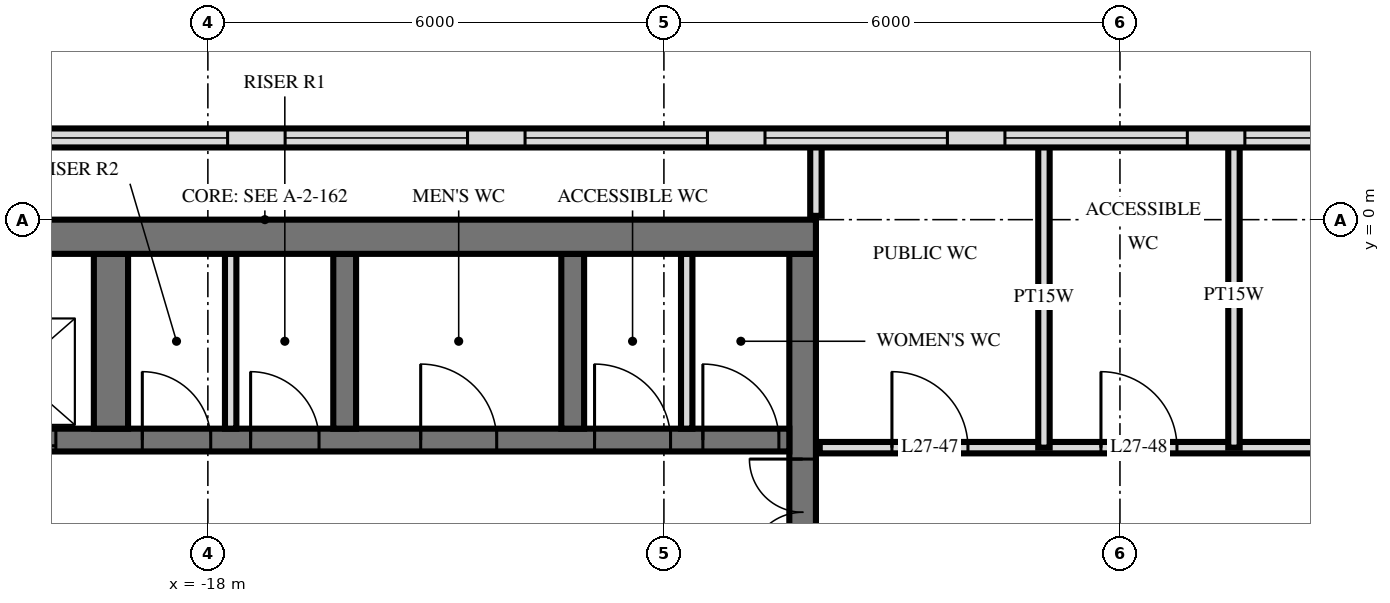
"""IFC4 building model, lengths in metres.
Left out: names, types, materials, properties, quantities, classifications, styles, units other than length and angle.
Written with IfcOpenShell. Run it as: python <this file> out.ifc"""

import sys

from ifc_helpers import new_model, si_unit, direction, frame, frame_2d, origin, place, context, subcontext, project, spatial, rectangle, extrude, element, fill, save


model = new_model("IFC4")
c1 = context("Model", 3, precision=1e-05, world=origin(), true_north=direction((0.0, 1.0)))
c2 = subcontext(c1, "Body", "Model", "MODEL_VIEW")
j1 = project(units=[si_unit("LENGTHUNIT", "METRE"), si_unit("PLANEANGLEUNIT", "RADIAN")], contexts=[c1])
p1 = place(None, origin())
s1 = spatial("IfcSite", under=j1, at=p1, CompositionType="ELEMENT")
p2 = place(p1, origin())
s2 = spatial("IfcBuilding", under=s1, at=p2, CompositionType="ELEMENT")
p3 = place(p2, frame((0.0, 0.0, 106.8)))
s3 = spatial("IfcBuildingStorey", under=s2, at=p3, CompositionType="ELEMENT", Elevation=106.8)
p4 = place(p3, frame((-24.5, -0.225, 0.0), z_axis=(0.0, 0.0, 1.0), x_axis=(1.0, 0.0, 0.0)))
e1 = element("IfcWall", 1, at=p4, inside=s3, PredefinedType="SHEAR", context=c2, shape_type="SweptSolid", body=[
    extrude(rectangle(XDim=14.5, YDim=0.45, at=frame_2d((7.25, 0.0))), origin(), (0.0, 0.0, 1.0), 6.0),
])
p5 = place(p3, frame((-10.175, -14.55, 0.0), z_axis=(0.0, 0.0, 1.0), x_axis=(0.0, 1.0, 0.0)))
e2 = element("IfcWall", 2, at=p5, inside=s3, PredefinedType="SHEAR", context=c2, shape_type="SweptSolid", body=[
    extrude(rectangle(XDim=14.1, YDim=0.35, at=frame_2d((7.05, 0.0))), origin(), (0.0, 0.0, 1.0), 6.0),
])
p6 = place(p5, frame((8.4, 0.0, 0.0)))
e3 = element("IfcOpeningElement", 3, at=p6, cuts=e2, PredefinedType="OPENING", context=c2, shape_type="SweptSolid", body=[
    extrude(rectangle(XDim=1.4, YDim=2.4, at=frame_2d((0.7, 1.2))), frame((0.0, 0.185, 0.0), z_axis=(0.0, -1.0, 0.0), x_axis=(1.0, 0.0, 0.0)), (0.0, 0.0, 1.0), 0.37),
])
p7 = place(p5, frame((10.0, 0.0, 0.0)))
e4 = element("IfcOpeningElement", 4, at=p7, cuts=e2, PredefinedType="OPENING", context=c2, shape_type="SweptSolid", body=[
    extrude(rectangle(XDim=1.4, YDim=2.4, at=frame_2d((0.7, 1.2))), frame((0.0, 0.185, 0.0), z_axis=(0.0, -1.0, 0.0), x_axis=(1.0, 0.0, 0.0)), (0.0, 0.0, 1.0), 0.37),
])
p8 = place(p5, frame((4.0, 0.0, 0.0)))
e5 = element("IfcOpeningElement", 5, at=p8, cuts=e2, PredefinedType="OPENING", context=c2, shape_type="SweptSolid", body=[
    extrude(rectangle(XDim=1.2, YDim=2.1, at=frame_2d((0.6, 1.05))), frame((0.0, 0.185, 0.0), z_axis=(0.0, -1.0, 0.0), x_axis=(1.0, 0.0, 0.0)), (0.0, 0.0, 1.0), 0.37),
])
p9 = place(p3, frame((-24.05, -2.9, 0.0), z_axis=(0.0, 0.0, 1.0), x_axis=(1.0, 0.0, 0.0)))
e6 = element("IfcWall", 6, at=p9, inside=s3, PredefinedType="SHEAR", context=c2, shape_type="SweptSolid", body=[
    extrude(rectangle(XDim=13.7, YDim=0.3, at=frame_2d((6.85, 0.0))), origin(), (0.0, 0.0, 1.0), 6.0),
])
p10 = place(p9, frame((2.95, 0.0, 0.0)))
e7 = element("IfcOpeningElement", 7, at=p10, cuts=e6, PredefinedType="OPENING", context=c2, shape_type="SweptSolid", body=[
    extrude(rectangle(XDim=1.1, YDim=2.1, at=frame_2d((0.55, 1.05))), frame((0.0, 0.16, 0.0), z_axis=(0.0, -1.0, 0.0), x_axis=(1.0, 0.0, 0.0)), (0.0, 0.0, 1.0), 0.32),
])
p11 = place(p9, frame((0.55, 0.0, 0.0)))
e8 = element("IfcOpeningElement", 8, at=p11, cuts=e6, PredefinedType="OPENING", context=c2, shape_type="SweptSolid", body=[
    extrude(rectangle(XDim=1.1, YDim=2.1, at=frame_2d((0.55, 1.05))), frame((0.0, 0.16, 0.0), z_axis=(0.0, -1.0, 0.0), x_axis=(1.0, 0.0, 0.0)), (0.0, 0.0, 1.0), 0.32),
])
p12 = place(p9, frame((6.613, 0.0, 0.0)))
e9 = element("IfcOpeningElement", 9, at=p12, cuts=e6, PredefinedType="OPENING", context=c2, shape_type="SweptSolid", body=[
    extrude(rectangle(XDim=0.9, YDim=2.1, at=frame_2d((0.45, 1.05))), frame((0.0, 0.16, 0.0), z_axis=(0.0, -1.0, 0.0), x_axis=(1.0, 0.0, 0.0)), (0.0, 0.0, 1.0), 0.32),
])
p13 = place(p9, frame((5.188, 0.0, 0.0)))
e10 = element("IfcOpeningElement", 10, at=p13, cuts=e6, PredefinedType="OPENING", context=c2, shape_type="SweptSolid", body=[
    extrude(rectangle(XDim=0.9, YDim=2.1, at=frame_2d((0.45, 1.05))), frame((0.0, 0.16, 0.0), z_axis=(0.0, -1.0, 0.0), x_axis=(1.0, 0.0, 0.0)), (0.0, 0.0, 1.0), 0.32),
])
p14 = place(p9, frame((12.562, 0.0, 0.0)))
e11 = element("IfcOpeningElement", 11, at=p14, cuts=e6, PredefinedType="OPENING", context=c2, shape_type="SweptSolid", body=[
    extrude(rectangle(XDim=1.0, YDim=2.1, at=frame_2d((0.5, 1.05))), frame((0.0, 0.16, 0.0), z_axis=(0.0, -1.0, 0.0), x_axis=(1.0, 0.0, 0.0)), (0.0, 0.0, 1.0), 0.32),
])
p15 = place(p9, frame((11.137, 0.0, 0.0)))
e12 = element("IfcOpeningElement", 12, at=p15, cuts=e6, PredefinedType="OPENING", context=c2, shape_type="SweptSolid", body=[
    extrude(rectangle(XDim=1.0, YDim=2.1, at=frame_2d((0.5, 1.05))), frame((0.0, 0.16, 0.0), z_axis=(0.0, -1.0, 0.0), x_axis=(1.0, 0.0, 0.0)), (0.0, 0.0, 1.0), 0.32),
])
p16 = place(p9, frame((8.85, 0.0, 0.0)))
e13 = element("IfcOpeningElement", 13, at=p16, cuts=e6, PredefinedType="OPENING", context=c2, shape_type="SweptSolid", body=[
    extrude(rectangle(XDim=1.0, YDim=2.1, at=frame_2d((0.5, 1.05))), frame((0.0, 0.16, 0.0), z_axis=(0.0, -1.0, 0.0), x_axis=(1.0, 0.0, 0.0)), (0.0, 0.0, 1.0), 0.32),
])
for number, where, z_axis, x_axis in (
    (14, (-13.2, -2.75, 0.0), (0.0, 0.0, 1.0), (0.0, 1.0, 0.0)),
    (15, (-16.2, -2.75, 0.0), (0.0, 0.0, 1.0), (0.0, 1.0, 0.0)),
):
    element("IfcWall", number, at=place(p3, frame(where, z_axis=z_axis, x_axis=x_axis)), inside=s3, PredefinedType="SHEAR", context=c2, shape_type="SweptSolid", body=[
        extrude(rectangle(XDim=2.3, YDim=0.3, at=frame_2d((1.15, 0.0))), origin(), (0.0, 0.0, 1.0), 6.0),
    ])
p17 = place(p3, frame((-19.275, -2.75, 0.0), z_axis=(0.0, 0.0, 1.0), x_axis=(0.0, 1.0, 0.0)))
e16 = element("IfcWall", 16, at=p17, inside=s3, PredefinedType="SHEAR", context=c2, shape_type="SweptSolid", body=[
    extrude(rectangle(XDim=2.3, YDim=0.45, at=frame_2d((1.15, 0.0))), origin(), (0.0, 0.0, 1.0), 6.0),
])
p18 = place(p3, frame((23.675, 1.075, 0.0), z_axis=(0.0, 0.0, 1.0), x_axis=(-1.0, 0.0, 0.0)))
e17 = element("IfcWall", 17, at=p18, inside=s3, PredefinedType="SOLIDWALL", context=c2, shape_type="SweptSolid", body=[
    extrude(rectangle(XDim=47.351, YDim=0.25, at=frame_2d((23.675, 0.0))), origin(), (0.0, 0.0, 1.0), 5.72),
])
p19 = place(p18, frame((0.378, 0.0, 0.858)))
e18 = element("IfcOpeningElement", 18, at=p19, cuts=e17, PredefinedType="OPENING", context=c2, shape_type="SweptSolid", body=[
    extrude(rectangle(XDim=2.4, YDim=3.6, at=frame_2d((1.2, 1.8))), frame((0.0, 0.135, 0.0), z_axis=(0.0, -1.0, 0.0), x_axis=(1.0, 0.0, 0.0)), (0.0, 0.0, 1.0), 0.27),
])
p20 = place(p18, frame((3.535, 0.0, 0.858)))
e19 = element("IfcOpeningElement", 19, at=p20, cuts=e17, PredefinedType="OPENING", context=c2, shape_type="SweptSolid", body=[
    extrude(rectangle(XDim=2.4, YDim=3.6, at=frame_2d((1.2, 1.8))), frame((0.0, 0.135, 0.0), z_axis=(0.0, -1.0, 0.0), x_axis=(1.0, 0.0, 0.0)), (0.0, 0.0, 1.0), 0.27),
])
p21 = place(p18, frame((6.692, 0.0, 0.858)))
e20 = element("IfcOpeningElement", 20, at=p21, cuts=e17, PredefinedType="OPENING", context=c2, shape_type="SweptSolid", body=[
    extrude(rectangle(XDim=2.4, YDim=3.6, at=frame_2d((1.2, 1.8))), frame((0.0, 0.135, 0.0), z_axis=(0.0, -1.0, 0.0), x_axis=(1.0, 0.0, 0.0)), (0.0, 0.0, 1.0), 0.27),
])
p22 = place(p18, frame((9.848, 0.0, 0.858)))
e21 = element("IfcOpeningElement", 21, at=p22, cuts=e17, PredefinedType="OPENING", context=c2, shape_type="SweptSolid", body=[
    extrude(rectangle(XDim=2.4, YDim=3.6, at=frame_2d((1.2, 1.8))), frame((0.0, 0.135, 0.0), z_axis=(0.0, -1.0, 0.0), x_axis=(1.0, 0.0, 0.0)), (0.0, 0.0, 1.0), 0.27),
])
p23 = place(p18, frame((13.005, 0.0, 0.858)))
e22 = element("IfcOpeningElement", 22, at=p23, cuts=e17, PredefinedType="OPENING", context=c2, shape_type="SweptSolid", body=[
    extrude(rectangle(XDim=2.4, YDim=3.6, at=frame_2d((1.2, 1.8))), frame((0.0, 0.135, 0.0), z_axis=(0.0, -1.0, 0.0), x_axis=(1.0, 0.0, 0.0)), (0.0, 0.0, 1.0), 0.27),
])
p24 = place(p18, frame((16.162, 0.0, 0.858)))
e23 = element("IfcOpeningElement", 23, at=p24, cuts=e17, PredefinedType="OPENING", context=c2, shape_type="SweptSolid", body=[
    extrude(rectangle(XDim=2.4, YDim=3.6, at=frame_2d((1.2, 1.8))), frame((0.0, 0.135, 0.0), z_axis=(0.0, -1.0, 0.0), x_axis=(1.0, 0.0, 0.0)), (0.0, 0.0, 1.0), 0.27),
])
p25 = place(p18, frame((19.319, 0.0, 0.858)))
e24 = element("IfcOpeningElement", 24, at=p25, cuts=e17, PredefinedType="OPENING", context=c2, shape_type="SweptSolid", body=[
    extrude(rectangle(XDim=2.4, YDim=3.6, at=frame_2d((1.2, 1.8))), frame((0.0, 0.135, 0.0), z_axis=(0.0, -1.0, 0.0), x_axis=(1.0, 0.0, 0.0)), (0.0, 0.0, 1.0), 0.27),
])
p26 = place(p18, frame((22.475, 0.0, 0.858)))
e25 = element("IfcOpeningElement", 25, at=p26, cuts=e17, PredefinedType="OPENING", context=c2, shape_type="SweptSolid", body=[
    extrude(rectangle(XDim=2.4, YDim=3.6, at=frame_2d((1.2, 1.8))), frame((0.0, 0.135, 0.0), z_axis=(0.0, -1.0, 0.0), x_axis=(1.0, 0.0, 0.0)), (0.0, 0.0, 1.0), 0.27),
])
p27 = place(p18, frame((25.632, 0.0, 0.858)))
e26 = element("IfcOpeningElement", 26, at=p27, cuts=e17, PredefinedType="OPENING", context=c2, shape_type="SweptSolid", body=[
    extrude(rectangle(XDim=2.4, YDim=3.6, at=frame_2d((1.2, 1.8))), frame((0.0, 0.135, 0.0), z_axis=(0.0, -1.0, 0.0), x_axis=(1.0, 0.0, 0.0)), (0.0, 0.0, 1.0), 0.27),
])
p28 = place(p18, frame((28.789, 0.0, 0.858)))
e27 = element("IfcOpeningElement", 27, at=p28, cuts=e17, PredefinedType="OPENING", context=c2, shape_type="SweptSolid", body=[
    extrude(rectangle(XDim=2.4, YDim=3.6, at=frame_2d((1.2, 1.8))), frame((0.0, 0.135, 0.0), z_axis=(0.0, -1.0, 0.0), x_axis=(1.0, 0.0, 0.0)), (0.0, 0.0, 1.0), 0.27),
])
p29 = place(p18, frame((31.946, 0.0, 0.858)))
e28 = element("IfcOpeningElement", 28, at=p29, cuts=e17, PredefinedType="OPENING", context=c2, shape_type="SweptSolid", body=[
    extrude(rectangle(XDim=2.4, YDim=3.6, at=frame_2d((1.2, 1.8))), frame((0.0, 0.135, 0.0), z_axis=(0.0, -1.0, 0.0), x_axis=(1.0, 0.0, 0.0)), (0.0, 0.0, 1.0), 0.27),
])
p30 = place(p18, frame((35.102, 0.0, 0.858)))
e29 = element("IfcOpeningElement", 29, at=p30, cuts=e17, PredefinedType="OPENING", context=c2, shape_type="SweptSolid", body=[
    extrude(rectangle(XDim=2.4, YDim=3.6, at=frame_2d((1.2, 1.8))), frame((0.0, 0.135, 0.0), z_axis=(0.0, -1.0, 0.0), x_axis=(1.0, 0.0, 0.0)), (0.0, 0.0, 1.0), 0.27),
])
p31 = place(p18, frame((38.259, 0.0, 0.858)))
e30 = element("IfcOpeningElement", 30, at=p31, cuts=e17, PredefinedType="OPENING", context=c2, shape_type="SweptSolid", body=[
    extrude(rectangle(XDim=2.4, YDim=3.6, at=frame_2d((1.2, 1.8))), frame((0.0, 0.135, 0.0), z_axis=(0.0, -1.0, 0.0), x_axis=(1.0, 0.0, 0.0)), (0.0, 0.0, 1.0), 0.27),
])
p32 = place(p18, frame((41.416, 0.0, 0.858)))
e31 = element("IfcOpeningElement", 31, at=p32, cuts=e17, PredefinedType="OPENING", context=c2, shape_type="SweptSolid", body=[
    extrude(rectangle(XDim=2.4, YDim=3.6, at=frame_2d((1.2, 1.8))), frame((0.0, 0.135, 0.0), z_axis=(0.0, -1.0, 0.0), x_axis=(1.0, 0.0, 0.0)), (0.0, 0.0, 1.0), 0.27),
])
p33 = place(p18, frame((44.573, 0.0, 0.858)))
e32 = element("IfcOpeningElement", 32, at=p33, cuts=e17, PredefinedType="OPENING", context=c2, shape_type="SweptSolid", body=[
    extrude(rectangle(XDim=2.4, YDim=3.6, at=frame_2d((1.2, 1.8))), frame((0.0, 0.135, 0.0), z_axis=(0.0, -1.0, 0.0), x_axis=(1.0, 0.0, 0.0)), (0.0, 0.0, 1.0), 0.27),
])
for number, where, z_axis, x_axis in (
    (33, (-17.7, -2.75, 0.0), (0.0, 0.0, 1.0), (0.0, 1.0, 0.0)),
    (34, (-11.7, -2.75, 0.0), (0.0, 0.0, 1.0), (0.0, 1.0, 0.0)),
):
    element("IfcWall", number, at=place(p3, frame(where, z_axis=z_axis, x_axis=x_axis)), inside=s3, PredefinedType="PARTITIONING", context=c2, shape_type="SweptSolid", body=[
        extrude(rectangle(XDim=2.3, YDim=0.15, at=frame_2d((1.15, 0.0))), origin(), (0.0, 0.0, 1.0), 5.7),
    ])
p34 = place(p3, frame((-4.5, -3.0, 0.0), z_axis=(0.0, 0.0, 1.0), x_axis=(0.0, 1.0, 0.0)))
e35 = element("IfcWall", 35, at=p34, inside=s3, PredefinedType="PLUMBINGWALL", context=c2, shape_type="SweptSolid", body=[
    extrude(rectangle(XDim=4.02, YDim=0.15, at=frame_2d((2.01, 0.0))), origin(), (0.0, 0.0, 1.0), 5.7),
])
p35 = place(p3, frame((-7.0, -3.0, 0.0), z_axis=(0.0, 0.0, 1.0), x_axis=(0.0, 1.0, 0.0)))
e36 = element("IfcWall", 36, at=p35, inside=s3, PredefinedType="PLUMBINGWALL", context=c2, shape_type="SweptSolid", body=[
    extrude(rectangle(XDim=3.96, YDim=0.15, at=frame_2d((1.98, 0.0))), origin(), (0.0, 0.0, 1.0), 5.7),
])
p36 = place(p3, frame((-10.0, 0.05, 0.0), z_axis=(0.0, 0.0, 1.0), x_axis=(0.0, 1.0, 0.0)))
e37 = element("IfcWall", 37, at=p36, inside=s3, PredefinedType="PLUMBINGWALL", context=c2, shape_type="SweptSolid", body=[
    extrude(rectangle(XDim=0.91, YDim=0.15, at=frame_2d((0.455, 0.0))), origin(), (0.0, 0.0, 1.0), 5.7),
])
p37 = place(p3, frame((-9.95, -3.0, 0.0), z_axis=(0.0, 0.0, 1.0), x_axis=(1.0, 0.0, 0.0)))
e38 = element("IfcWall", 38, at=p37, inside=s3, PredefinedType="PARTITIONING", context=c2, shape_type="SweptSolid", body=[
    extrude(rectangle(XDim=19.9, YDim=0.15, at=frame_2d((9.95, 0.0))), origin(), (0.0, 0.0, 1.0), 5.7),
])
p38 = place(p37, frame((0.95, 0.0, 0.0)))
e39 = element("IfcOpeningElement", 39, at=p38, cuts=e38, PredefinedType="OPENING", context=c2, shape_type="SweptSolid", body=[
    extrude(rectangle(XDim=1.0, YDim=2.1, at=frame_2d((0.5, 1.05))), frame((0.0, 0.085, 0.0), z_axis=(0.0, -1.0, 0.0), x_axis=(1.0, 0.0, 0.0)), (0.0, 0.0, 1.0), 0.17),
])
p39 = place(p37, frame((3.7, 0.0, 0.0)))
e40 = element("IfcOpeningElement", 40, at=p39, cuts=e38, PredefinedType="OPENING", context=c2, shape_type="SweptSolid", body=[
    extrude(rectangle(XDim=1.0, YDim=2.1, at=frame_2d((0.5, 1.05))), frame((0.0, 0.085, 0.0), z_axis=(0.0, -1.0, 0.0), x_axis=(1.0, 0.0, 0.0)), (0.0, 0.0, 1.0), 0.17),
])
p40 = place(p37, frame((7.0, 0.0, 0.0)))
e41 = element("IfcOpeningElement", 41, at=p40, cuts=e38, PredefinedType="OPENING", context=c2, shape_type="SweptSolid", body=[
    extrude(rectangle(XDim=1.0, YDim=2.1, at=frame_2d((0.5, 1.05))), frame((0.0, 0.085, 0.0), z_axis=(0.0, -1.0, 0.0), x_axis=(1.0, 0.0, 0.0)), (0.0, 0.0, 1.0), 0.17),
])
p41 = place(p37, frame((16.9, 0.0, 0.0)))
e42 = element("IfcOpeningElement", 42, at=p41, cuts=e38, PredefinedType="OPENING", context=c2, shape_type="SweptSolid", body=[
    extrude(rectangle(XDim=1.0, YDim=2.1, at=frame_2d((0.5, 1.05))), frame((0.0, 0.085, 0.0), z_axis=(0.0, -1.0, 0.0), x_axis=(1.0, 0.0, 0.0)), (0.0, 0.0, 1.0), 0.17),
])
p42 = place(p27, origin())
e43 = element("IfcWindow", 43, at=p42, inside=s3, PartitioningType="SINGLE_PANEL", PredefinedType="USERDEFINED", context=c2, shape_type="SweptSolid", body=[
    extrude(rectangle(XDim=2.4, YDim=3.6, at=frame_2d((1.2, 1.8))), frame((0.0, 0.03, 0.0), z_axis=(0.0, -1.0, 0.0), x_axis=(1.0, 0.0, 0.0)), (0.0, 0.0, 1.0), 0.06),
])
fill(e26, e43)
p43 = place(p28, origin())
e44 = element("IfcWindow", 44, at=p43, inside=s3, PartitioningType="SINGLE_PANEL", PredefinedType="USERDEFINED", context=c2, shape_type="SweptSolid", body=[
    extrude(rectangle(XDim=2.4, YDim=3.6, at=frame_2d((1.2, 1.8))), frame((0.0, 0.03, 0.0), z_axis=(0.0, -1.0, 0.0), x_axis=(1.0, 0.0, 0.0)), (0.0, 0.0, 1.0), 0.06),
])
fill(e27, e44)
p44 = place(p29, origin())
e45 = element("IfcWindow", 45, at=p44, inside=s3, PartitioningType="SINGLE_PANEL", PredefinedType="USERDEFINED", context=c2, shape_type="SweptSolid", body=[
    extrude(rectangle(XDim=2.4, YDim=3.6, at=frame_2d((1.2, 1.8))), frame((0.0, 0.03, 0.0), z_axis=(0.0, -1.0, 0.0), x_axis=(1.0, 0.0, 0.0)), (0.0, 0.0, 1.0), 0.06),
])
fill(e28, e45)
p45 = place(p30, origin())
e46 = element("IfcWindow", 46, at=p45, inside=s3, PartitioningType="SINGLE_PANEL", PredefinedType="USERDEFINED", context=c2, shape_type="SweptSolid", body=[
    extrude(rectangle(XDim=2.4, YDim=3.6, at=frame_2d((1.2, 1.8))), frame((0.0, 0.03, 0.0), z_axis=(0.0, -1.0, 0.0), x_axis=(1.0, 0.0, 0.0)), (0.0, 0.0, 1.0), 0.06),
])
fill(e29, e46)
p46 = place(p31, origin())
e47 = element("IfcWindow", 47, at=p46, inside=s3, PartitioningType="SINGLE_PANEL", PredefinedType="USERDEFINED", context=c2, shape_type="SweptSolid", body=[
    extrude(rectangle(XDim=2.4, YDim=3.6, at=frame_2d((1.2, 1.8))), frame((0.0, 0.03, 0.0), z_axis=(0.0, -1.0, 0.0), x_axis=(1.0, 0.0, 0.0)), (0.0, 0.0, 1.0), 0.06),
])
fill(e30, e47)
p47 = place(p32, origin())
e48 = element("IfcWindow", 48, at=p47, inside=s3, PartitioningType="SINGLE_PANEL", PredefinedType="USERDEFINED", context=c2, shape_type="SweptSolid", body=[
    extrude(rectangle(XDim=2.4, YDim=3.6, at=frame_2d((1.2, 1.8))), frame((0.0, 0.03, 0.0), z_axis=(0.0, -1.0, 0.0), x_axis=(1.0, 0.0, 0.0)), (0.0, 0.0, 1.0), 0.06),
])
fill(e31, e48)
p48 = place(p10, origin())
e49 = element("IfcDoor", 49, at=p48, inside=s3, OperationType="DOUBLE_DOOR_SLIDING", PredefinedType="USERDEFINED", context=c2, shape_type="SweptSolid", body=[
    extrude(rectangle(XDim=1.1, YDim=2.1, at=frame_2d((0.55, 1.05))), frame((0.0, 0.025, 0.0), z_axis=(0.0, -1.0, 0.0), x_axis=(1.0, 0.0, 0.0)), (0.0, 0.0, 1.0), 0.05),
])
fill(e7, e49)
p49 = place(p7, origin())
e50 = element("IfcDoor", 50, at=p49, inside=s3, OperationType="DOUBLE_DOOR_SINGLE_SWING", PredefinedType="DOOR", context=c2, shape_type="SweptSolid", body=[
    extrude(rectangle(XDim=1.4, YDim=2.4, at=frame_2d((0.7, 1.2))), frame((0.0, 0.025, 0.0), z_axis=(0.0, -1.0, 0.0), x_axis=(1.0, 0.0, 0.0)), (0.0, 0.0, 1.0), 0.05),
])
fill(e4, e50)
p50 = place(p12, origin())
e51 = element("IfcDoor", 51, at=p50, inside=s3, OperationType="SINGLE_SWING_RIGHT", PredefinedType="DOOR", context=c2, shape_type="SweptSolid", body=[
    extrude(rectangle(XDim=0.9, YDim=2.1, at=frame_2d((0.45, 1.05))), frame((0.0, 0.025, 0.0), z_axis=(0.0, -1.0, 0.0), x_axis=(1.0, 0.0, 0.0)), (0.0, 0.0, 1.0), 0.05),
])
fill(e9, e51)
p51 = place(p13, origin())
e52 = element("IfcDoor", 52, at=p51, inside=s3, OperationType="SINGLE_SWING_RIGHT", PredefinedType="DOOR", context=c2, shape_type="SweptSolid", body=[
    extrude(rectangle(XDim=0.9, YDim=2.1, at=frame_2d((0.45, 1.05))), frame((0.0, 0.025, 0.0), z_axis=(0.0, -1.0, 0.0), x_axis=(1.0, 0.0, 0.0)), (0.0, 0.0, 1.0), 0.05),
])
fill(e10, e52)
p52 = place(p14, origin())
e53 = element("IfcDoor", 53, at=p52, inside=s3, OperationType="SINGLE_SWING_RIGHT", PredefinedType="DOOR", context=c2, shape_type="SweptSolid", body=[
    extrude(rectangle(XDim=1.0, YDim=2.1, at=frame_2d((0.5, 1.05))), frame((0.0, 0.025, 0.0), z_axis=(0.0, -1.0, 0.0), x_axis=(1.0, 0.0, 0.0)), (0.0, 0.0, 1.0), 0.05),
])
fill(e11, e53)
p53 = place(p15, origin())
e54 = element("IfcDoor", 54, at=p53, inside=s3, OperationType="SINGLE_SWING_RIGHT", PredefinedType="DOOR", context=c2, shape_type="SweptSolid", body=[
    extrude(rectangle(XDim=1.0, YDim=2.1, at=frame_2d((0.5, 1.05))), frame((0.0, 0.025, 0.0), z_axis=(0.0, -1.0, 0.0), x_axis=(1.0, 0.0, 0.0)), (0.0, 0.0, 1.0), 0.05),
])
fill(e12, e54)
p54 = place(p16, origin())
e55 = element("IfcDoor", 55, at=p54, inside=s3, OperationType="SINGLE_SWING_RIGHT", PredefinedType="DOOR", context=c2, shape_type="SweptSolid", body=[
    extrude(rectangle(XDim=1.0, YDim=2.1, at=frame_2d((0.5, 1.05))), frame((0.0, 0.025, 0.0), z_axis=(0.0, -1.0, 0.0), x_axis=(1.0, 0.0, 0.0)), (0.0, 0.0, 1.0), 0.05),
])
fill(e13, e55)
p55 = place(p38, origin())
e56 = element("IfcDoor", 56, at=p55, inside=s3, OperationType="SINGLE_SWING_RIGHT", PredefinedType="DOOR", context=c2, shape_type="SweptSolid", body=[
    extrude(rectangle(XDim=1.0, YDim=2.1, at=frame_2d((0.5, 1.05))), frame((0.0, 0.025, 0.0), z_axis=(0.0, -1.0, 0.0), x_axis=(1.0, 0.0, 0.0)), (0.0, 0.0, 1.0), 0.05),
])
fill(e39, e56)
p56 = place(p39, origin())
e57 = element("IfcDoor", 57, at=p56, inside=s3, OperationType="SINGLE_SWING_RIGHT", PredefinedType="DOOR", context=c2, shape_type="SweptSolid", body=[
    extrude(rectangle(XDim=1.0, YDim=2.1, at=frame_2d((0.5, 1.05))), frame((0.0, 0.025, 0.0), z_axis=(0.0, -1.0, 0.0), x_axis=(1.0, 0.0, 0.0)), (0.0, 0.0, 1.0), 0.05),
])
fill(e40, e57)
save(model, sys.argv[1])
